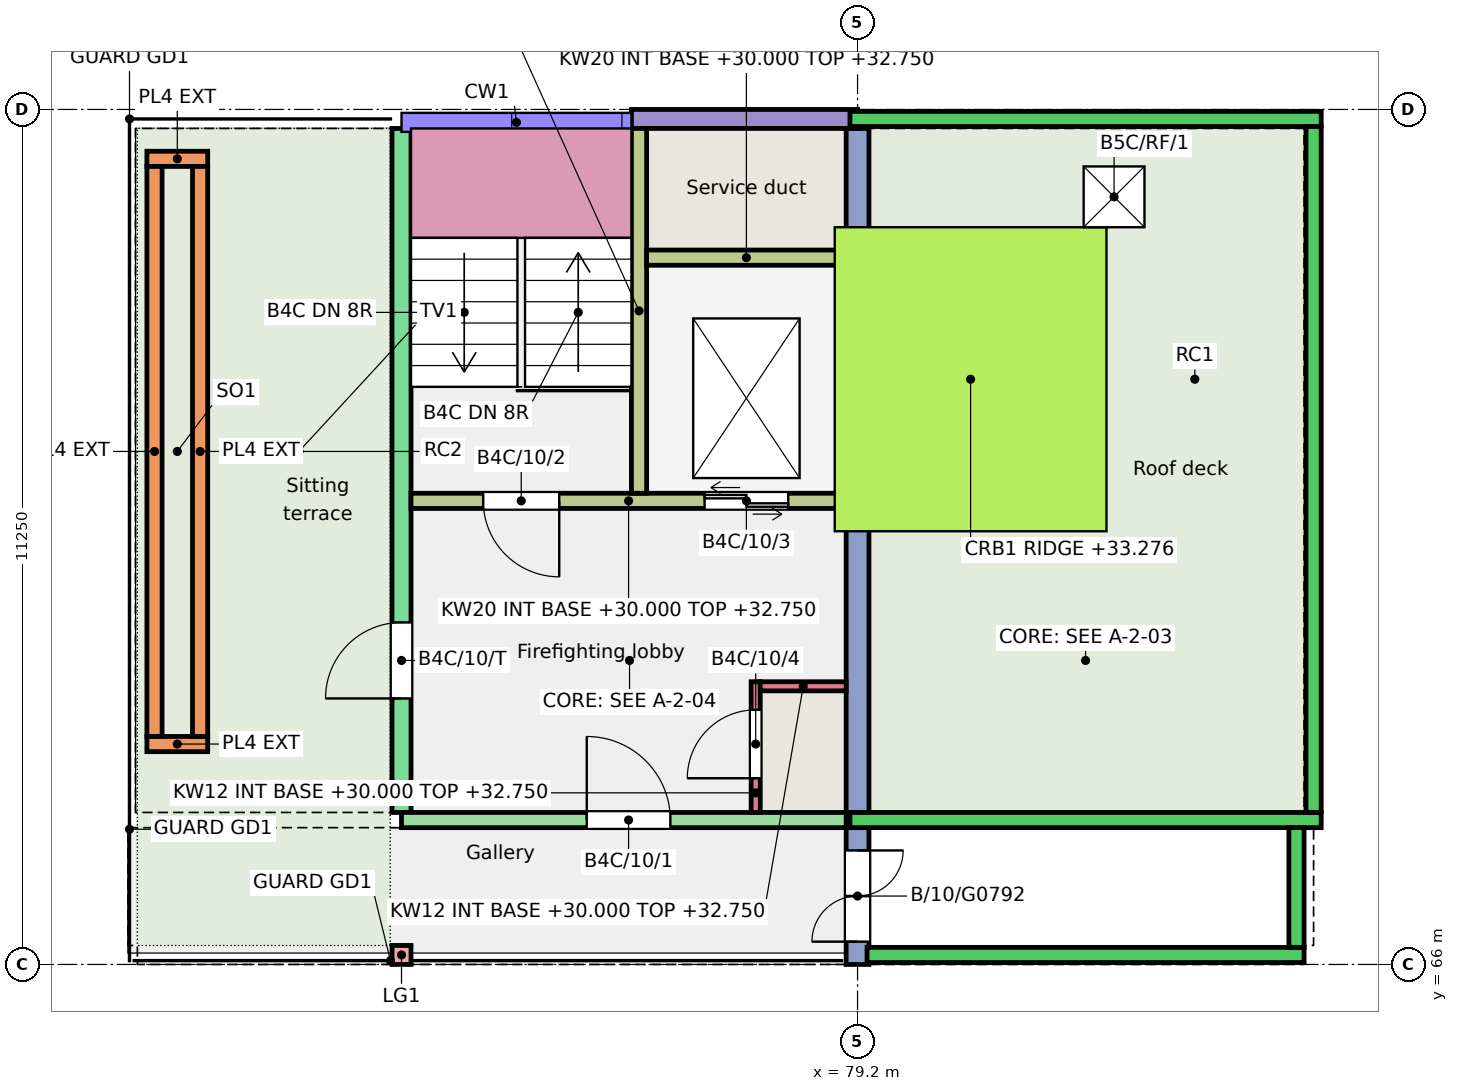
"""IFC4 building model, lengths in metres.
Left out: names, types, materials, properties, quantities, classifications, styles, units other than length and angle.
Written with IfcOpenShell. Run it as: python <this file> out.ifc"""

import sys

from ifc_helpers import new_model, si_unit, direction, frame, frame_2d, origin, origin_2d, place, context, subcontext, project, spatial, rectangle, extrude, element, fill, save


model = new_model("IFC4")
c1 = context("Model", 3, precision=1e-05, world=origin(), true_north=direction((0.0, 1.0)))
c2 = subcontext(c1, "Body", "Model", "MODEL_VIEW")
j1 = project(units=[si_unit("LENGTHUNIT", "METRE"), si_unit("PLANEANGLEUNIT", "RADIAN")], contexts=[c1])
p1 = place(None, origin())
s1 = spatial("IfcSite", under=j1, at=p1, CompositionType="ELEMENT")
p2 = place(p1, origin())
s2 = spatial("IfcBuilding", under=s1, at=p2, CompositionType="ELEMENT")
p3 = place(p2, frame((0.0, 0.0, 30.0)))
s3 = spatial("IfcBuildingStorey", under=s2, at=p3, CompositionType="ELEMENT", Elevation=30.0)
p4 = place(p3, frame((73.2, 68.0, 0.0), z_axis=(0.0, 0.0, 1.0), x_axis=(0.0, 1.0, 0.0)))
e1 = element("IfcWall", 1, at=p4, inside=s3, PredefinedType="SHEAR", context=c2, shape_type="SweptSolid", body=[
    extrude(rectangle(XDim=9.0, YDim=0.25, at=frame_2d((4.5, 0.0))), origin(), (0.0, 0.0, 1.0), 3.0),
])
p5 = place(p4, frame((1.5, 0.0, 0.0)))
e2 = element("IfcOpeningElement", 2, at=p5, cuts=e1, PredefinedType="OPENING", context=c2, shape_type="SweptSolid", body=[
    extrude(rectangle(XDim=1.0, YDim=2.1, at=frame_2d((0.5, 1.05))), frame((0.0, 0.135, 0.0), z_axis=(0.0, -1.0, 0.0), x_axis=(1.0, 0.0, 0.0)), (0.0, 0.0, 1.0), 0.27),
])
p6 = place(p3, frame((79.2, 66.0, 0.0), z_axis=(0.0, 0.0, 1.0), x_axis=(0.0, 1.0, 0.0)))
e3 = element("IfcWall", 3, at=p6, inside=s3, PredefinedType="SHEAR", context=c2, shape_type="SweptSolid", body=[
    extrude(rectangle(XDim=11.0, YDim=0.3, at=frame_2d((5.5, 0.0))), origin(), (0.0, 0.0, 1.0), 3.0),
])
p7 = place(p6, frame((0.3, 0.0, 0.0)))
e4 = element("IfcOpeningElement", 4, at=p7, cuts=e3, PredefinedType="OPENING", context=c2, shape_type="SweptSolid", body=[
    extrude(rectangle(XDim=1.2, YDim=2.1, at=frame_2d((0.6, 1.05))), frame((0.0, 0.16, 0.0), z_axis=(0.0, -1.0, 0.0), x_axis=(1.0, 0.0, 0.0)), (0.0, 0.0, 1.0), 0.32),
])
p8 = place(p3, frame((76.225, 77.125, 0.0), z_axis=(0.0, 0.0, 1.0), x_axis=(1.0, 0.0, 0.0)))
e5 = element("IfcWall", 5, at=p8, inside=s3, PredefinedType="SOLIDWALL", context=c2, shape_type="SweptSolid", body=[
    extrude(rectangle(XDim=2.975, YDim=0.25, at=frame_2d((1.487, 0.0))), origin(), (0.0, 0.0, 1.0), 3.0),
])
p9 = place(p3, frame((73.2, 67.9, 0.0), z_axis=(0.0, 0.0, 1.0), x_axis=(1.0, 0.0, 0.0)))
e6 = element("IfcWall", 6, at=p9, inside=s3, PredefinedType="SHEAR", context=c2, shape_type="SweptSolid", body=[
    extrude(rectangle(XDim=5.85, YDim=0.2, at=frame_2d((2.925, 0.0))), origin(), (0.0, 0.0, 1.0), 2.75),
])
p10 = place(p9, frame((2.438, 0.0, 0.0)))
e7 = element("IfcOpeningElement", 7, at=p10, cuts=e6, PredefinedType="OPENING", context=c2, shape_type="SweptSolid", body=[
    extrude(rectangle(XDim=1.1, YDim=2.1, at=frame_2d((0.55, 1.05))), frame((0.0, 0.11, 0.0), z_axis=(0.0, -1.0, 0.0), x_axis=(1.0, 0.0, 0.0)), (0.0, 0.0, 1.0), 0.22),
])
p11 = place(p3, frame((73.325, 72.1, 0.0), z_axis=(0.0, 0.0, 1.0), x_axis=(1.0, 0.0, 0.0)))
e8 = element("IfcWall", 8, at=p11, inside=s3, PredefinedType="SHEAR", context=c2, shape_type="SweptSolid", body=[
    extrude(rectangle(XDim=5.725, YDim=0.2, at=frame_2d((2.863, 0.0))), origin(), (0.0, 0.0, 1.0), 2.75),
])
p12 = place(p11, frame((0.95, 0.0, 0.0)))
e9 = element("IfcOpeningElement", 9, at=p12, cuts=e8, PredefinedType="OPENING", context=c2, shape_type="SweptSolid", body=[
    extrude(rectangle(XDim=1.0, YDim=2.1, at=frame_2d((0.5, 1.05))), frame((0.0, 0.11, 0.0), z_axis=(0.0, -1.0, 0.0), x_axis=(1.0, 0.0, 0.0)), (0.0, 0.0, 1.0), 0.22),
])
p13 = place(p11, frame((3.863, 0.0, 0.0)))
e10 = element("IfcOpeningElement", 10, at=p13, cuts=e8, PredefinedType="OPENING", context=c2, shape_type="SweptSolid", body=[
    extrude(rectangle(XDim=1.1, YDim=2.1, at=frame_2d((0.55, 1.05))), frame((0.0, 0.11, 0.0), z_axis=(0.0, -1.0, 0.0), x_axis=(1.0, 0.0, 0.0)), (0.0, 0.0, 1.0), 0.22),
])
p14 = place(p3, frame((76.325, 72.2, 0.0), z_axis=(0.0, 0.0, 1.0), x_axis=(0.0, 1.0, 0.0)))
e11 = element("IfcWall", 11, at=p14, inside=s3, PredefinedType="SHEAR", context=c2, shape_type="SweptSolid", body=[
    extrude(rectangle(XDim=4.8, YDim=0.2, at=frame_2d((2.4, 0.0))), origin(), (0.0, 0.0, 1.0), 2.75),
])
p15 = place(p3, frame((76.425, 75.3, 0.0), z_axis=(0.0, 0.0, 1.0), x_axis=(1.0, 0.0, 0.0)))
e12 = element("IfcWall", 12, at=p15, inside=s3, PredefinedType="SHEAR", context=c2, shape_type="SweptSolid", body=[
    extrude(rectangle(XDim=2.625, YDim=0.2, at=frame_2d((1.312, 0.0))), origin(), (0.0, 0.0, 1.0), 2.75),
])
p16 = place(p3, frame((77.86, 68.0, 0.0), z_axis=(0.0, 0.0, 1.0), x_axis=(0.0, 1.0, 0.0)))
e13 = element("IfcWall", 13, at=p16, inside=s3, PredefinedType="SHEAR", context=c2, shape_type="SweptSolid", body=[
    extrude(rectangle(XDim=1.72, YDim=0.12, at=frame_2d((0.86, 0.0))), origin(), (0.0, 0.0, 1.0), 2.75),
])
p17 = place(p16, frame((0.45, 0.0, 0.0)))
e14 = element("IfcOpeningElement", 14, at=p17, cuts=e13, PredefinedType="OPENING", context=c2, shape_type="SweptSolid", body=[
    extrude(rectangle(XDim=0.9, YDim=2.1, at=frame_2d((0.45, 1.05))), frame((0.0, 0.07, 0.0), z_axis=(0.0, -1.0, 0.0), x_axis=(1.0, 0.0, 0.0)), (0.0, 0.0, 1.0), 0.14),
])
p18 = place(p3, frame((77.92, 69.66, 0.0), z_axis=(0.0, 0.0, 1.0), x_axis=(1.0, 0.0, 0.0)))
e15 = element("IfcWall", 15, at=p18, inside=s3, PredefinedType="SHEAR", context=c2, shape_type="SweptSolid", body=[
    extrude(rectangle(XDim=1.13, YDim=0.12, at=frame_2d((0.565, 0.0))), origin(), (0.0, 0.0, 1.0), 2.75),
])
p19 = place(p3, frame((73.2, 66.125, 0.0), z_axis=(0.0, 0.0, 1.0), x_axis=(1.0, 0.0, 0.0)))
e16 = element("IfcColumn", 16, at=p19, inside=s3, PredefinedType="COLUMN", context=c2, shape_type="SweptSolid", body=[
    extrude(rectangle(XDim=0.25, YDim=0.25, at=origin_2d()), origin(), (0.0, 0.0, 1.0), 3.0),
])
for number, where, z_axis, x_axis in (
    (17, (79.35, 72.1, 0.0), (0.0, 0.0, 1.0), (1.0, 0.0, 0.0)),
    (18, (79.35, 75.3, 0.0), (0.0, 0.0, 1.0), (1.0, 0.0, 0.0)),
):
    element("IfcWall", number, at=place(p3, frame(where, z_axis=z_axis, x_axis=x_axis)), inside=s3, PredefinedType="SHEAR", context=c2, shape_type="SweptSolid", body=[
        extrude(rectangle(XDim=2.825, YDim=0.2, at=frame_2d((1.413, 0.0))), origin(), (0.0, 0.0, 1.0), 1.5),
    ])
p20 = place(p3, frame((82.075, 72.2, 0.0), z_axis=(0.0, 0.0, 1.0), x_axis=(0.0, 1.0, 0.0)))
e19 = element("IfcWall", 19, at=p20, inside=s3, PredefinedType="SHEAR", context=c2, shape_type="SweptSolid", body=[
    extrude(rectangle(XDim=3.0, YDim=0.2, at=frame_2d((1.5, 0.0))), origin(), (0.0, 0.0, 1.0), 1.5),
])
for number, where, z_axis, x_axis in (
    (20, (79.1, 77.125, 0.0), (0.0, 0.0, 1.0), (1.0, 0.0, 0.0)),
    (21, (79.1, 67.9, 0.0), (0.0, 0.0, 1.0), (1.0, 0.0, 0.0)),
):
    element("IfcWall", number, at=place(p3, frame(where, z_axis=z_axis, x_axis=x_axis)), inside=s3, PredefinedType="PARAPET", context=c2, shape_type="SweptSolid", body=[
        extrude(rectangle(XDim=6.2, YDim=0.2, at=frame_2d((3.1, 0.0))), origin(), (0.0, 0.0, 1.0), 1.1),
    ])
p21 = place(p3, frame((85.2, 68.0, 0.0), z_axis=(0.0, 0.0, 1.0), x_axis=(0.0, 1.0, 0.0)))
e22 = element("IfcWall", 22, at=p21, inside=s3, PredefinedType="PARAPET", context=c2, shape_type="SweptSolid", body=[
    extrude(rectangle(XDim=9.025, YDim=0.2, at=frame_2d((4.512, 0.0))), origin(), (0.0, 0.0, 1.0), 1.1),
])
p22 = place(p3, frame((79.325, 66.125, 0.0), z_axis=(0.0, 0.0, 1.0), x_axis=(1.0, 0.0, 0.0)))
e23 = element("IfcWall", 23, at=p22, inside=s3, PredefinedType="PARAPET", context=c2, shape_type="SweptSolid", body=[
    extrude(rectangle(XDim=5.75, YDim=0.2, at=frame_2d((2.875, 0.0))), origin(), (0.0, 0.0, 1.0), 1.1),
])
p23 = place(p3, frame((84.975, 66.225, 0.0), z_axis=(0.0, 0.0, 1.0), x_axis=(0.0, 1.0, 0.0)))
e24 = element("IfcWall", 24, at=p23, inside=s3, PredefinedType="PARAPET", context=c2, shape_type="SweptSolid", body=[
    extrude(rectangle(XDim=1.575, YDim=0.2, at=frame_2d((0.788, 0.0))), origin(), (0.0, 0.0, 1.0), 1.1),
])
for number, where, z_axis, x_axis in (
    (25, (69.85, 68.9, 0.01), (0.0, 0.0, 1.0), (1.0, 0.0, 0.0)),
    (26, (69.85, 76.6, 0.01), (0.0, 0.0, 1.0), (1.0, 0.0, 0.0)),
):
    element("IfcWall", number, at=place(p3, frame(where, z_axis=z_axis, x_axis=x_axis)), inside=s3, PredefinedType="SOLIDWALL", context=c2, shape_type="SweptSolid", body=[
        extrude(rectangle(XDim=0.8, YDim=0.2, at=frame_2d((0.4, 0.0))), origin(), (0.0, 0.0, 1.0), 0.45),
    ])
for number, where, z_axis, x_axis in (
    (27, (69.95, 69.0, 0.01), (0.0, 0.0, 1.0), (0.0, 1.0, 0.0)),
    (28, (70.55, 69.0, 0.01), (0.0, 0.0, 1.0), (0.0, 1.0, 0.0)),
):
    element("IfcWall", number, at=place(p3, frame(where, z_axis=z_axis, x_axis=x_axis)), inside=s3, PredefinedType="SOLIDWALL", context=c2, shape_type="SweptSolid", body=[
        extrude(rectangle(XDim=7.5, YDim=0.2, at=frame_2d((3.75, 0.0))), origin(), (0.0, 0.0, 1.0), 0.45),
    ])
p24 = place(p3, frame((0.0, 0.0, -0.25)))
p25 = place(p24, frame((82.575, 76.1, 0.0)))
p26 = place(p25, frame((0.0, 0.0, 0.2)))
e29 = element("IfcDoor", 29, at=p26, inside=s3, OperationType="SINGLE_SWING_LEFT", PredefinedType="TRAPDOOR", context=c2, shape_type="SweptSolid", body=[
    extrude(rectangle(XDim=0.8, YDim=0.8, at=origin_2d()), origin(), (0.0, 0.0, 1.0), 0.05),
])
p27 = place(p10, origin())
e30 = element("IfcDoor", 30, at=p27, inside=s3, OperationType="SINGLE_SWING_LEFT", PredefinedType="DOOR", context=c2, shape_type="SweptSolid", body=[
    extrude(rectangle(XDim=1.1, YDim=2.1, at=frame_2d((0.55, 1.05))), frame((0.0, 0.025, 0.0), z_axis=(0.0, -1.0, 0.0), x_axis=(1.0, 0.0, 0.0)), (0.0, 0.0, 1.0), 0.05),
])
fill(e7, e30)
p28 = place(p12, origin())
e31 = element("IfcDoor", 31, at=p28, inside=s3, OperationType="SINGLE_SWING_RIGHT", PredefinedType="DOOR", context=c2, shape_type="SweptSolid", body=[
    extrude(rectangle(XDim=1.0, YDim=2.1, at=frame_2d((0.5, 1.05))), frame((0.0, 0.025, 0.0), z_axis=(0.0, -1.0, 0.0), x_axis=(1.0, 0.0, 0.0)), (0.0, 0.0, 1.0), 0.05),
])
fill(e9, e31)
p29 = place(p13, origin())
e32 = element("IfcDoor", 32, at=p29, inside=s3, OperationType="DOUBLE_DOOR_SLIDING", PredefinedType="DOOR", context=c2, shape_type="SweptSolid", body=[
    extrude(rectangle(XDim=1.1, YDim=2.1, at=frame_2d((0.55, 1.05))), frame((0.0, 0.025, 0.0), z_axis=(0.0, -1.0, 0.0), x_axis=(1.0, 0.0, 0.0)), (0.0, 0.0, 1.0), 0.05),
])
fill(e10, e32)
p30 = place(p17, origin())
e33 = element("IfcDoor", 33, at=p30, inside=s3, OperationType="SINGLE_SWING_LEFT", PredefinedType="DOOR", context=c2, shape_type="SweptSolid", body=[
    extrude(rectangle(XDim=0.9, YDim=2.1, at=frame_2d((0.45, 1.05))), frame((0.0, 0.025, 0.0), z_axis=(0.0, -1.0, 0.0), x_axis=(1.0, 0.0, 0.0)), (0.0, 0.0, 1.0), 0.05),
])
fill(e14, e33)
p31 = place(p5, origin())
e34 = element("IfcDoor", 34, at=p31, inside=s3, OperationType="SINGLE_SWING_LEFT", PredefinedType="DOOR", context=c2, shape_type="SweptSolid", body=[
    extrude(rectangle(XDim=1.0, YDim=2.1, at=frame_2d((0.5, 1.05))), frame((0.0, 0.025, 0.0), z_axis=(0.0, -1.0, 0.0), x_axis=(1.0, 0.0, 0.0)), (0.0, 0.0, 1.0), 0.05),
])
fill(e2, e34)
p32 = place(p7, origin())
e35 = element("IfcDoor", 35, at=p32, inside=s3, OperationType="DOUBLE_DOOR_SINGLE_SWING", PredefinedType="DOOR", context=c2, shape_type="SweptSolid", body=[
    extrude(rectangle(XDim=1.2, YDim=2.1, at=frame_2d((0.6, 1.05))), frame((0.0, 0.025, 0.0), z_axis=(0.0, -1.0, 0.0), x_axis=(1.0, 0.0, 0.0)), (0.0, 0.0, 1.0), 0.05),
])
fill(e4, e35)
save(model, sys.argv[1])
